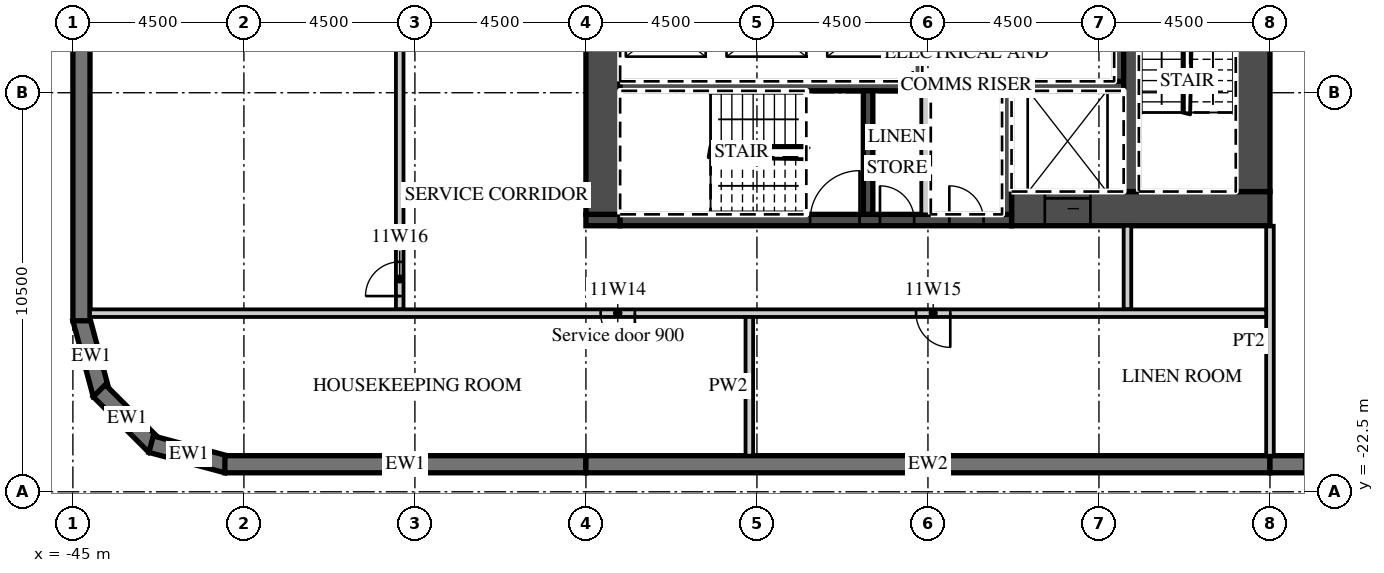
"""IFC4 building model, lengths in metres.
Left out: names, types, materials, properties, quantities, classifications, styles, units other than length and angle.
Written with IfcOpenShell. Run it as: python <this file> out.ifc"""

import sys

from ifc_helpers import new_model, si_unit, direction, frame, frame_2d, origin, place, context, subcontext, project, spatial, polyline, rectangle, outline, extrude, element, fill, save


model = new_model("IFC4")
c1 = context("Model", 3, precision=1e-05, world=origin(), true_north=direction((0.0, 1.0)))
c2 = subcontext(c1, "Body", "Model", "MODEL_VIEW")
j1 = project(units=[si_unit("LENGTHUNIT", "METRE"), si_unit("PLANEANGLEUNIT", "RADIAN")], contexts=[c1])
p1 = place(None, origin())
s1 = spatial("IfcSite", under=j1, at=p1, CompositionType="ELEMENT")
p2 = place(p1, origin())
s2 = spatial("IfcBuilding", under=s1, at=p2, CompositionType="ELEMENT")
p3 = place(p2, frame((0.0, 0.0, 66.6)))
s3 = spatial("IfcBuildingStorey", under=s2, at=p3, CompositionType="ELEMENT", Elevation=66.6)
p4 = place(p3, frame((-44.783, -17.942, 0.0), z_axis=(0.0, 0.0, 1.0), x_axis=(0.25881466832, -0.965926999034, 0.0)))
e1 = element("IfcWall", 1, at=p4, inside=s3, PredefinedType="SOLIDWALL", context=c2, shape_type="SweptSolid", body=[
    extrude(outline(polyline([(0.0, -0.225), (2.071, -0.225), (1.95, 0.225), (0.121, 0.225), (0.0, -0.225)])), origin(), (0.0, 0.0, 1.0), 3.02),
])
p5 = place(p3, frame((-44.305, -19.841, 0.0), z_axis=(0.0, 0.0, 1.0), x_axis=(0.707106781187, -0.707106781187, 0.0)))
e2 = element("IfcWall", 2, at=p5, inside=s3, PredefinedType="SOLIDWALL", context=c2, shape_type="SweptSolid", body=[
    extrude(outline(polyline([(0.0, -0.225), (2.071, -0.225), (1.95, 0.225), (0.121, 0.225), (0.0, -0.225)])), origin(), (0.0, 0.0, 1.0), 3.02),
])
p6 = place(p3, frame((-42.942, -21.247, 0.0), z_axis=(0.0, 0.0, 1.0), x_axis=(0.965926999034, -0.25881466832, 0.0)))
e3 = element("IfcWall", 3, at=p6, inside=s3, PredefinedType="SOLIDWALL", context=c2, shape_type="SweptSolid", body=[
    extrude(outline(polyline([(-0.0, -0.225), (2.07, -0.225), (1.95, 0.225), (0.12, 0.225), (-0.0, -0.225)])), origin(), (0.0, 0.0, 1.0), 3.02),
])
p7 = place(p3, frame((-41.0, -21.775, 0.0), z_axis=(0.0, 0.0, 1.0), x_axis=(1.0, 0.0, 0.0)))
e4 = element("IfcWall", 4, at=p7, inside=s3, PredefinedType="SOLIDWALL", context=c2, shape_type="SweptSolid", body=[
    extrude(rectangle(XDim=9.5, YDim=0.45, at=frame_2d((4.75, 0.0))), origin(), (0.0, 0.0, 1.0), 3.02),
])
p8 = place(p3, frame((-31.5, -21.775, 0.0), z_axis=(0.0, 0.0, 1.0), x_axis=(1.0, 0.0, 0.0)))
e5 = element("IfcWall", 5, at=p8, inside=s3, PredefinedType="SOLIDWALL", context=c2, shape_type="SweptSolid", body=[
    extrude(rectangle(XDim=18.0, YDim=0.45, at=frame_2d((9.0, 0.0))), origin(), (0.0, 0.0, 1.0), 3.02),
])
p9 = place(p3, frame((-13.5, -21.775, 0.0), z_axis=(0.0, 0.0, 1.0), x_axis=(1.0, 0.0, 0.0)))
e6 = element("IfcWall", 6, at=p9, inside=s3, PredefinedType="SOLIDWALL", context=c2, shape_type="SweptSolid", body=[
    extrude(rectangle(XDim=54.5, YDim=0.45, at=frame_2d((27.25, 0.0))), origin(), (0.0, 0.0, 1.0), 3.02),
])
p10 = place(p9, frame((0.9, 0.0, 0.45)))
e7 = element("IfcOpeningElement", 7, at=p10, cuts=e6, PredefinedType="OPENING", context=c2, shape_type="SweptSolid", body=[
    extrude(rectangle(XDim=2.7, YDim=2.25, at=frame_2d((1.35, 1.125))), frame((0.0, 0.235, 0.0), z_axis=(0.0, -1.0, 0.0), x_axis=(1.0, 0.0, 0.0)), (0.0, 0.0, 1.0), 0.47),
])
p11 = place(p9, frame((5.4, 0.0, 0.45)))
e8 = element("IfcOpeningElement", 8, at=p11, cuts=e6, PredefinedType="OPENING", context=c2, shape_type="SweptSolid", body=[
    extrude(rectangle(XDim=2.7, YDim=2.25, at=frame_2d((1.35, 1.125))), frame((0.0, 0.235, 0.0), z_axis=(0.0, -1.0, 0.0), x_axis=(1.0, 0.0, 0.0)), (0.0, 0.0, 1.0), 0.47),
])
p12 = place(p9, frame((9.9, 0.0, 0.45)))
e9 = element("IfcOpeningElement", 9, at=p12, cuts=e6, PredefinedType="OPENING", context=c2, shape_type="SweptSolid", body=[
    extrude(rectangle(XDim=2.7, YDim=2.25, at=frame_2d((1.35, 1.125))), frame((0.0, 0.235, 0.0), z_axis=(0.0, -1.0, 0.0), x_axis=(1.0, 0.0, 0.0)), (0.0, 0.0, 1.0), 0.47),
])
p13 = place(p9, frame((14.4, 0.0, 0.45)))
e10 = element("IfcOpeningElement", 10, at=p13, cuts=e6, PredefinedType="OPENING", context=c2, shape_type="SweptSolid", body=[
    extrude(rectangle(XDim=2.7, YDim=2.25, at=frame_2d((1.35, 1.125))), frame((0.0, 0.235, 0.0), z_axis=(0.0, -1.0, 0.0), x_axis=(1.0, 0.0, 0.0)), (0.0, 0.0, 1.0), 0.47),
])
p14 = place(p9, frame((18.9, 0.0, 0.45)))
e11 = element("IfcOpeningElement", 11, at=p14, cuts=e6, PredefinedType="OPENING", context=c2, shape_type="SweptSolid", body=[
    extrude(rectangle(XDim=2.7, YDim=2.25, at=frame_2d((1.35, 1.125))), frame((0.0, 0.235, 0.0), z_axis=(0.0, -1.0, 0.0), x_axis=(1.0, 0.0, 0.0)), (0.0, 0.0, 1.0), 0.47),
])
p15 = place(p9, frame((23.4, 0.0, 0.45)))
e12 = element("IfcOpeningElement", 12, at=p15, cuts=e6, PredefinedType="OPENING", context=c2, shape_type="SweptSolid", body=[
    extrude(rectangle(XDim=2.7, YDim=2.25, at=frame_2d((1.35, 1.125))), frame((0.0, 0.235, 0.0), z_axis=(0.0, -1.0, 0.0), x_axis=(1.0, 0.0, 0.0)), (0.0, 0.0, 1.0), 0.47),
])
p16 = place(p9, frame((27.9, 0.0, 0.45)))
e13 = element("IfcOpeningElement", 13, at=p16, cuts=e6, PredefinedType="OPENING", context=c2, shape_type="SweptSolid", body=[
    extrude(rectangle(XDim=2.7, YDim=2.25, at=frame_2d((1.35, 1.125))), frame((0.0, 0.235, 0.0), z_axis=(0.0, -1.0, 0.0), x_axis=(1.0, 0.0, 0.0)), (0.0, 0.0, 1.0), 0.47),
])
p17 = place(p9, frame((32.4, 0.0, 0.45)))
e14 = element("IfcOpeningElement", 14, at=p17, cuts=e6, PredefinedType="OPENING", context=c2, shape_type="SweptSolid", body=[
    extrude(rectangle(XDim=2.7, YDim=2.25, at=frame_2d((1.35, 1.125))), frame((0.0, 0.235, 0.0), z_axis=(0.0, -1.0, 0.0), x_axis=(1.0, 0.0, 0.0)), (0.0, 0.0, 1.0), 0.47),
])
p18 = place(p9, frame((36.9, 0.0, 0.45)))
e15 = element("IfcOpeningElement", 15, at=p18, cuts=e6, PredefinedType="OPENING", context=c2, shape_type="SweptSolid", body=[
    extrude(rectangle(XDim=2.7, YDim=2.25, at=frame_2d((1.35, 1.125))), frame((0.0, 0.235, 0.0), z_axis=(0.0, -1.0, 0.0), x_axis=(1.0, 0.0, 0.0)), (0.0, 0.0, 1.0), 0.47),
])
p19 = place(p9, frame((41.4, 0.0, 0.45)))
e16 = element("IfcOpeningElement", 16, at=p19, cuts=e6, PredefinedType="OPENING", context=c2, shape_type="SweptSolid", body=[
    extrude(rectangle(XDim=2.7, YDim=2.25, at=frame_2d((1.35, 1.125))), frame((0.0, 0.235, 0.0), z_axis=(0.0, -1.0, 0.0), x_axis=(1.0, 0.0, 0.0)), (0.0, 0.0, 1.0), 0.47),
])
p20 = place(p9, frame((45.9, 0.0, 0.45)))
e17 = element("IfcOpeningElement", 17, at=p20, cuts=e6, PredefinedType="OPENING", context=c2, shape_type="SweptSolid", body=[
    extrude(rectangle(XDim=2.7, YDim=2.25, at=frame_2d((1.35, 1.125))), frame((0.0, 0.235, 0.0), z_axis=(0.0, -1.0, 0.0), x_axis=(1.0, 0.0, 0.0)), (0.0, 0.0, 1.0), 0.47),
])
p21 = place(p9, frame((50.4, 0.0, 0.45)))
e18 = element("IfcOpeningElement", 18, at=p21, cuts=e6, PredefinedType="OPENING", context=c2, shape_type="SweptSolid", body=[
    extrude(rectangle(XDim=2.7, YDim=2.25, at=frame_2d((1.35, 1.125))), frame((0.0, 0.235, 0.0), z_axis=(0.0, -1.0, 0.0), x_axis=(1.0, 0.0, 0.0)), (0.0, 0.0, 1.0), 0.47),
])
p22 = place(p3, frame((-44.775, 18.0, 0.0), z_axis=(0.0, 0.0, 1.0), x_axis=(0.0, -1.0, 0.0)))
e19 = element("IfcWall", 19, at=p22, inside=s3, PredefinedType="SOLIDWALL", context=c2, shape_type="SweptSolid", body=[
    extrude(rectangle(XDim=36.0, YDim=0.45, at=frame_2d((18.0, 0.0))), origin(), (0.0, 0.0, 1.0), 3.02),
])
p23 = place(p22, frame((3.9, 0.0, 0.45)))
e20 = element("IfcOpeningElement", 20, at=p23, cuts=e19, PredefinedType="OPENING", context=c2, shape_type="SweptSolid", body=[
    extrude(rectangle(XDim=3.3, YDim=2.25, at=frame_2d((1.65, 1.125))), frame((0.0, 0.235, 0.0), z_axis=(0.0, -1.0, 0.0), x_axis=(1.0, 0.0, 0.0)), (0.0, 0.0, 1.0), 0.47),
])
p24 = place(p22, frame((8.4, 0.0, 0.45)))
e21 = element("IfcOpeningElement", 21, at=p24, cuts=e19, PredefinedType="OPENING", context=c2, shape_type="SweptSolid", body=[
    extrude(rectangle(XDim=3.3, YDim=2.25, at=frame_2d((1.65, 1.125))), frame((0.0, 0.235, 0.0), z_axis=(0.0, -1.0, 0.0), x_axis=(1.0, 0.0, 0.0)), (0.0, 0.0, 1.0), 0.47),
])
p25 = place(p22, frame((12.9, 0.0, 0.45)))
e22 = element("IfcOpeningElement", 22, at=p25, cuts=e19, PredefinedType="OPENING", context=c2, shape_type="SweptSolid", body=[
    extrude(rectangle(XDim=3.3, YDim=2.25, at=frame_2d((1.65, 1.125))), frame((0.0, 0.235, 0.0), z_axis=(0.0, -1.0, 0.0), x_axis=(1.0, 0.0, 0.0)), (0.0, 0.0, 1.0), 0.47),
])
p26 = place(p3, frame((-13.5, -21.55, 0.0), z_axis=(0.0, 0.0, 1.0), x_axis=(0.0, 1.0, 0.0)))
e23 = element("IfcWall", 23, at=p26, inside=s3, PredefinedType="PARTITIONING", context=c2, shape_type="SweptSolid", body=[
    extrude(rectangle(XDim=6.05, YDim=0.2, at=frame_2d((3.025, 0.0))), origin(), (0.0, 0.0, 1.0), 3.02),
])
p27 = place(p3, frame((-20.3, -15.05, 0.0), z_axis=(0.0, 0.0, 1.0), x_axis=(1.0, 0.0, 0.0)))
e24 = element("IfcWall", 24, at=p27, inside=s3, PredefinedType="SHEAR", context=c2, shape_type="SweptSolid", body=[
    extrude(rectangle(XDim=6.8, YDim=0.9, at=frame_2d((3.4, 0.0))), origin(), (0.0, 0.0, 1.0), 3.02),
])
p28 = place(p27, frame((0.875, 0.0, 0.0)))
e25 = element("IfcOpeningElement", 25, at=p28, cuts=e24, PredefinedType="OPENING", context=c2, shape_type="SweptSolid", body=[
    extrude(rectangle(XDim=1.2, YDim=2.1, at=frame_2d((0.6, 1.05))), frame((0.0, 0.46, 0.0), z_axis=(0.0, -1.0, 0.0), x_axis=(1.0, 0.0, 0.0)), (0.0, 0.0, 1.0), 0.92),
])
p29 = place(p3, frame((-31.5, -15.35, 0.0), z_axis=(0.0, 0.0, 1.0), x_axis=(1.0, 0.0, 0.0)))
e26 = element("IfcWall", 26, at=p29, inside=s3, PredefinedType="SHEAR", context=c2, shape_type="SweptSolid", body=[
    extrude(rectangle(XDim=0.9, YDim=0.3, at=frame_2d((0.45, 0.0))), origin(), (0.0, 0.0, 1.0), 3.02),
])
p30 = place(p3, frame((-30.6, -15.35, 0.0), z_axis=(0.0, 0.0, 1.0), x_axis=(1.0, 0.0, 0.0)))
e27 = element("IfcWall", 27, at=p30, inside=s3, PredefinedType="SHEAR", context=c2, shape_type="SweptSolid", body=[
    extrude(rectangle(XDim=10.3, YDim=0.3, at=frame_2d((5.15, 0.0))), origin(), (0.0, 0.0, 1.0), 3.02),
])
p31 = place(p30, frame((5.0, 0.0, 0.0)))
e28 = element("IfcOpeningElement", 28, at=p31, cuts=e27, PredefinedType="OPENING", context=c2, shape_type="SweptSolid", body=[
    extrude(rectangle(XDim=1.3, YDim=2.1, at=frame_2d((0.65, 1.05))), frame((0.0, 0.16, 0.0), z_axis=(0.0, -1.0, 0.0), x_axis=(1.0, 0.0, 0.0)), (0.0, 0.0, 1.0), 0.32),
])
p32 = place(p30, frame((6.837, 0.0, 0.0)))
e29 = element("IfcOpeningElement", 29, at=p32, cuts=e27, PredefinedType="OPENING", context=c2, shape_type="SweptSolid", body=[
    extrude(rectangle(XDim=0.9, YDim=2.1, at=frame_2d((0.45, 1.05))), frame((0.0, 0.16, 0.0), z_axis=(0.0, -1.0, 0.0), x_axis=(1.0, 0.0, 0.0)), (0.0, 0.0, 1.0), 0.32),
])
p33 = place(p30, frame((8.663, 0.0, 0.0)))
e30 = element("IfcOpeningElement", 30, at=p33, cuts=e27, PredefinedType="OPENING", context=c2, shape_type="SweptSolid", body=[
    extrude(rectangle(XDim=0.9, YDim=2.1, at=frame_2d((0.45, 1.05))), frame((0.0, 0.16, 0.0), z_axis=(0.0, -1.0, 0.0), x_axis=(1.0, 0.0, 0.0)), (0.0, 0.0, 1.0), 0.32),
])
p34 = place(p3, frame((-31.05, -15.2, 0.0), z_axis=(0.0, 0.0, 1.0), x_axis=(0.0, 1.0, 0.0)))
e31 = element("IfcWall", 31, at=p34, inside=s3, PredefinedType="SHEAR", context=c2, shape_type="SweptSolid", body=[
    extrude(rectangle(XDim=12.8, YDim=0.9, at=frame_2d((6.4, 0.0))), origin(), (0.0, 0.0, 1.0), 3.02),
])
p35 = place(p34, frame((11.5, 0.0, 0.0)))
e32 = element("IfcOpeningElement", 32, at=p35, cuts=e31, PredefinedType="OPENING", context=c2, shape_type="SweptSolid", body=[
    extrude(rectangle(XDim=1.1, YDim=2.1, at=frame_2d((0.55, 1.05))), frame((0.0, 0.46, 0.0), z_axis=(0.0, -1.0, 0.0), x_axis=(1.0, 0.0, 0.0)), (0.0, 0.0, 1.0), 0.92),
])
p36 = place(p3, frame((-13.95, -14.6, 0.0), z_axis=(0.0, 0.0, 1.0), x_axis=(0.0, 1.0, 0.0)))
e33 = element("IfcWall", 33, at=p36, inside=s3, PredefinedType="SHEAR", context=c2, shape_type="SweptSolid", body=[
    extrude(rectangle(XDim=12.2, YDim=0.9, at=frame_2d((6.1, 0.0))), origin(), (0.0, 0.0, 1.0), 3.02),
])
p37 = place(p3, frame((-30.6, -11.825, 0.0), z_axis=(0.0, 0.0, 1.0), x_axis=(1.0, 0.0, 0.0)))
e34 = element("IfcWall", 34, at=p37, inside=s3, PredefinedType="SHEAR", context=c2, shape_type="SweptSolid", body=[
    extrude(rectangle(XDim=13.25, YDim=0.25, at=frame_2d((6.625, 0.0))), origin(), (0.0, 0.0, 1.0), 3.02),
])
for number, where, z_axis, x_axis in (
    (35, (-17.475, -11.7, 0.0), (0.0, 0.0, 1.0), (0.0, 1.0, 0.0)),
    (36, (-22.775, -11.7, 0.0), (0.0, 0.0, 1.0), (0.0, 1.0, 0.0)),
):
    element("IfcWall", number, at=place(p3, frame(where, z_axis=z_axis, x_axis=x_axis)), inside=s3, PredefinedType="SHEAR", context=c2, shape_type="SweptSolid", body=[
        extrude(rectangle(XDim=2.9, YDim=0.25, at=frame_2d((1.45, 0.0))), origin(), (0.0, 0.0, 1.0), 3.02),
    ])
p38 = place(p3, frame((-17.15, -14.6, 0.0), z_axis=(0.0, 0.0, 1.0), x_axis=(0.0, 1.0, 0.0)))
e37 = element("IfcWall", 37, at=p38, inside=s3, PredefinedType="SHEAR", context=c2, shape_type="SweptSolid", body=[
    extrude(rectangle(XDim=5.8, YDim=0.4, at=frame_2d((2.9, 0.0))), origin(), (0.0, 0.0, 1.0), 3.02),
])
for number, where, z_axis, x_axis in (
    (38, (-20.425, -15.2, 0.0), (0.0, 0.0, 1.0), (0.0, 1.0, 0.0)),
    (39, (-24.075, -15.2, 0.0), (0.0, 0.0, 1.0), (0.0, 1.0, 0.0)),
):
    element("IfcWall", number, at=place(p3, frame(where, z_axis=z_axis, x_axis=x_axis)), inside=s3, PredefinedType="SHEAR", context=c2, shape_type="SweptSolid", body=[
        extrude(rectangle(XDim=3.25, YDim=0.25, at=frame_2d((1.625, 0.0))), origin(), (0.0, 0.0, 1.0), 3.02),
    ])
p39 = place(p3, frame((-22.55, -15.2, 0.0), z_axis=(0.0, 0.0, 1.0), x_axis=(0.0, 1.0, 0.0)))
e40 = element("IfcWall", 40, at=p39, inside=s3, PredefinedType="PARTITIONING", context=c2, shape_type="SweptSolid", body=[
    extrude(rectangle(XDim=3.25, YDim=0.25, at=frame_2d((1.625, 0.0))), origin(), (0.0, 0.0, 1.0), 3.02),
])
p40 = place(p3, frame((-17.25, -17.7, 0.0), z_axis=(0.0, 0.0, 1.0), x_axis=(0.0, 1.0, 0.0)))
e41 = element("IfcWall", 41, at=p40, inside=s3, PredefinedType="PARTITIONING", context=c2, shape_type="SweptSolid", body=[
    extrude(rectangle(XDim=2.2, YDim=0.2, at=frame_2d((1.1, 0.0))), origin(), (0.0, 0.0, 1.0), 3.02),
])
p41 = place(p3, frame((-36.4, -17.7, 0.0), z_axis=(0.0, 0.0, 1.0), x_axis=(0.0, 1.0, 0.0)))
e42 = element("IfcWall", 42, at=p41, inside=s3, PredefinedType="PARTITIONING", context=c2, shape_type="SweptSolid", body=[
    extrude(rectangle(XDim=15.95, YDim=0.2, at=frame_2d((7.975, 0.0))), origin(), (0.0, 0.0, 1.0), 3.02),
])
p42 = place(p41, frame((0.35, 0.0, 0.0)))
e43 = element("IfcOpeningElement", 43, at=p42, cuts=e42, PredefinedType="OPENING", context=c2, shape_type="SweptSolid", body=[
    extrude(rectangle(XDim=0.9, YDim=2.1, at=frame_2d((0.45, 1.05))), frame((0.0, 0.11, 0.0), z_axis=(0.0, -1.0, 0.0), x_axis=(1.0, 0.0, 0.0)), (0.0, 0.0, 1.0), 0.22),
])
p43 = place(p3, frame((-44.55, -17.8, 0.0), z_axis=(0.0, 0.0, 1.0), x_axis=(1.0, 0.0, 0.0)))
e44 = element("IfcWall", 44, at=p43, inside=s3, PredefinedType="PARTITIONING", context=c2, shape_type="SweptSolid", body=[
    extrude(rectangle(XDim=30.95, YDim=0.2, at=frame_2d((15.475, 0.0))), origin(), (0.0, 0.0, 1.0), 3.02),
])
p44 = place(p43, frame((13.438, 0.0, 0.0)))
e45 = element("IfcOpeningElement", 45, at=p44, cuts=e44, PredefinedType="OPENING", context=c2, shape_type="SweptSolid", body=[
    extrude(rectangle(XDim=0.9, YDim=2.1, at=frame_2d((0.45, 1.05))), frame((0.0, 0.11, 0.0), z_axis=(0.0, -1.0, 0.0), x_axis=(1.0, 0.0, 0.0)), (0.0, 0.0, 1.0), 0.22),
])
p45 = place(p43, frame((21.738, 0.0, 0.0)))
e46 = element("IfcOpeningElement", 46, at=p45, cuts=e44, PredefinedType="OPENING", context=c2, shape_type="SweptSolid", body=[
    extrude(rectangle(XDim=0.9, YDim=2.1, at=frame_2d((0.45, 1.05))), frame((0.0, 0.11, 0.0), z_axis=(0.0, -1.0, 0.0), x_axis=(1.0, 0.0, 0.0)), (0.0, 0.0, 1.0), 0.22),
])
p46 = place(p3, frame((-27.2, -21.55, 0.0), z_axis=(0.0, 0.0, 1.0), x_axis=(0.0, 1.0, 0.0)))
e47 = element("IfcWall", 47, at=p46, inside=s3, PredefinedType="PARTITIONING", context=c2, shape_type="SweptSolid", body=[
    extrude(rectangle(XDim=3.65, YDim=0.2, at=frame_2d((1.825, 0.0))), origin(), (0.0, 0.0, 1.0), 3.02),
])
p47 = place(p28, origin())
e48 = element("IfcDoor", 48, at=p47, inside=s3, OperationType="SLIDING_TO_LEFT", PredefinedType="DOOR", context=c2, shape_type="SweptSolid", body=[
    extrude(rectangle(XDim=1.2, YDim=2.1, at=frame_2d((0.6, 1.05))), frame((0.0, 0.025, 0.0), z_axis=(0.0, -1.0, 0.0), x_axis=(1.0, 0.0, 0.0)), (0.0, 0.0, 1.0), 0.05),
])
fill(e25, e48)
p48 = place(p31, origin())
e49 = element("IfcDoor", 49, at=p48, inside=s3, OperationType="SINGLE_SWING_RIGHT", PredefinedType="DOOR", context=c2, shape_type="SweptSolid", body=[
    extrude(rectangle(XDim=1.3, YDim=2.1, at=frame_2d((0.65, 1.05))), frame((0.0, 0.025, 0.0), z_axis=(0.0, -1.0, 0.0), x_axis=(1.0, 0.0, 0.0)), (0.0, 0.0, 1.0), 0.05),
])
fill(e28, e49)
p49 = place(p32, origin())
e50 = element("IfcDoor", 50, at=p49, inside=s3, OperationType="SINGLE_SWING_LEFT", PredefinedType="DOOR", context=c2, shape_type="SweptSolid", body=[
    extrude(rectangle(XDim=0.9, YDim=2.1, at=frame_2d((0.45, 1.05))), frame((0.0, 0.025, 0.0), z_axis=(0.0, -1.0, 0.0), x_axis=(1.0, 0.0, 0.0)), (0.0, 0.0, 1.0), 0.05),
])
fill(e29, e50)
p50 = place(p33, origin())
e51 = element("IfcDoor", 51, at=p50, inside=s3, OperationType="SINGLE_SWING_LEFT", PredefinedType="DOOR", context=c2, shape_type="SweptSolid", body=[
    extrude(rectangle(XDim=0.9, YDim=2.1, at=frame_2d((0.45, 1.05))), frame((0.0, 0.025, 0.0), z_axis=(0.0, -1.0, 0.0), x_axis=(1.0, 0.0, 0.0)), (0.0, 0.0, 1.0), 0.05),
])
fill(e30, e51)
p51 = place(p44, origin())
e52 = element("IfcDoor", 52, at=p51, inside=s3, OperationType="SINGLE_SWING_RIGHT", PredefinedType="DOOR", context=c2, shape_type="SweptSolid", body=[
    extrude(rectangle(XDim=0.9, YDim=2.1, at=frame_2d((0.45, 1.05))), frame((0.0, 0.025, 0.0), z_axis=(0.0, -1.0, 0.0), x_axis=(1.0, 0.0, 0.0)), (0.0, 0.0, 1.0), 0.05),
])
fill(e45, e52)
p52 = place(p45, origin())
e53 = element("IfcDoor", 53, at=p52, inside=s3, OperationType="SINGLE_SWING_RIGHT", PredefinedType="DOOR", context=c2, shape_type="SweptSolid", body=[
    extrude(rectangle(XDim=0.9, YDim=2.1, at=frame_2d((0.45, 1.05))), frame((0.0, 0.025, 0.0), z_axis=(0.0, -1.0, 0.0), x_axis=(1.0, 0.0, 0.0)), (0.0, 0.0, 1.0), 0.05),
])
fill(e46, e53)
p53 = place(p42, origin())
e54 = element("IfcDoor", 54, at=p53, inside=s3, OperationType="SINGLE_SWING_LEFT", PredefinedType="DOOR", context=c2, shape_type="SweptSolid", body=[
    extrude(rectangle(XDim=0.9, YDim=2.1, at=frame_2d((0.45, 1.05))), frame((0.0, 0.025, 0.0), z_axis=(0.0, -1.0, 0.0), x_axis=(1.0, 0.0, 0.0)), (0.0, 0.0, 1.0), 0.05),
])
fill(e43, e54)
save(model, sys.argv[1])
